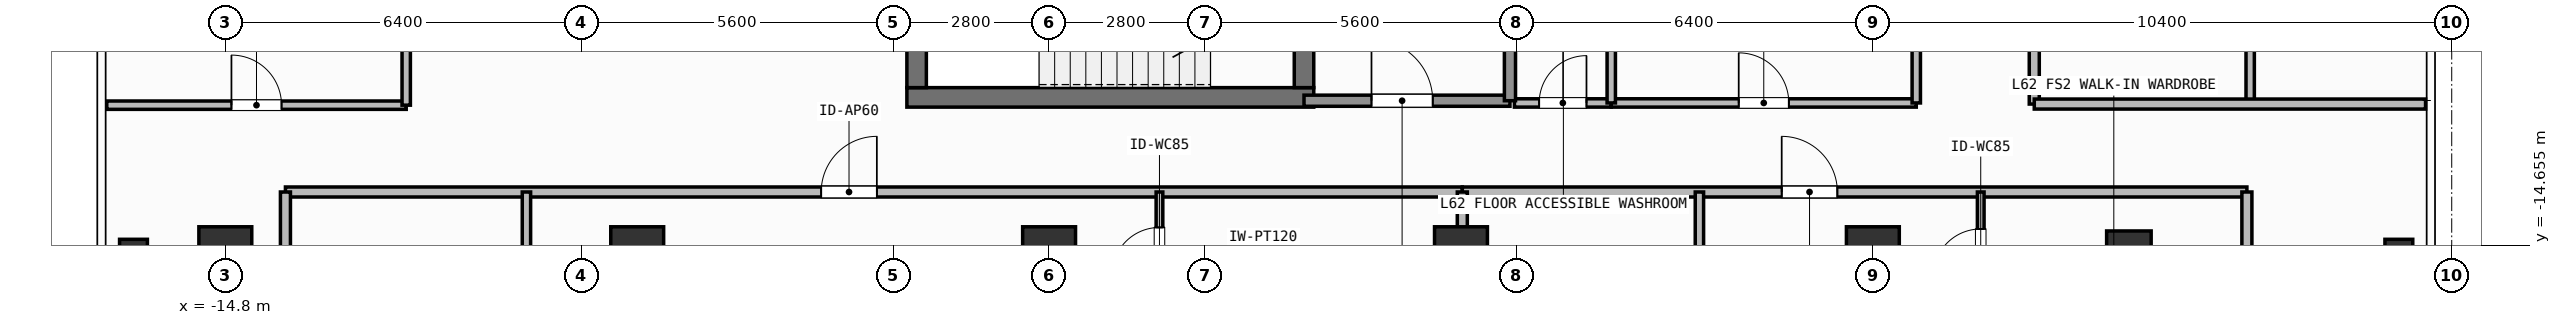
"""IFC4 building model, lengths in metres.
Left out: names, types, materials, properties, quantities, classifications, styles, units other than length and angle.
Written with IfcOpenShell. Run it as: python <this file> out.ifc"""

import sys

from ifc_helpers import new_model, si_unit, direction, frame, frame_2d, origin, origin_2d, place, context, subcontext, project, spatial, rectangle, hollow_rectangle, extrude, element, fill, save


model = new_model("IFC4")
c1 = context("Model", 3, precision=1e-05, world=origin(), true_north=direction((0.0, 1.0)))
c2 = subcontext(c1, "Body", "Model", "MODEL_VIEW")
j1 = project(units=[si_unit("LENGTHUNIT", "METRE"), si_unit("PLANEANGLEUNIT", "RADIAN")], contexts=[c1])
p1 = place(None, origin())
s1 = spatial("IfcSite", under=j1, at=p1, CompositionType="ELEMENT")
p2 = place(p1, origin())
s2 = spatial("IfcBuilding", under=s1, at=p2, CompositionType="ELEMENT")
p3 = place(p2, frame((0.0, 0.0, 254.7)))
s3 = spatial("IfcBuildingStorey", under=s2, at=p3, CompositionType="ELEMENT", Elevation=254.7)
p4 = place(p3, frame((-2.555, -12.0, 0.0), z_axis=(0.0, 0.0, 1.0), x_axis=(1.0, 0.0, 0.0)))
e1 = element("IfcWall", 1, at=p4, inside=s3, PredefinedType="SHEAR", context=c2, shape_type="SweptSolid", body=[
    extrude(rectangle(XDim=7.31, YDim=0.35, at=frame_2d((3.655, 0.0))), origin(), (0.0, 0.0, 1.0), 3.9),
])
p5 = place(p3, frame((-2.38, -11.825, 0.0), z_axis=(0.0, 0.0, 1.0), x_axis=(0.0, 1.0, 0.0)))
e2 = element("IfcWall", 2, at=p5, inside=s3, PredefinedType="SHEAR", context=c2, shape_type="SweptSolid", body=[
    extrude(rectangle(XDim=2.925, YDim=0.35, at=frame_2d((1.462, 0.0))), origin(), (0.0, 0.0, 1.0), 3.9),
])
p6 = place(p3, frame((4.58, -8.9, 0.0), z_axis=(0.0, 0.0, 1.0), x_axis=(0.0, -1.0, 0.0)))
e3 = element("IfcWall", 3, at=p6, inside=s3, PredefinedType="SHEAR", context=c2, shape_type="SweptSolid", body=[
    extrude(rectangle(XDim=2.925, YDim=0.35, at=frame_2d((1.462, 0.0))), origin(), (0.0, 0.0, 1.0), 3.9),
])
p7 = place(p6, frame((0.913, 0.0, 0.0)))
e4 = element("IfcOpeningElement", 4, at=p7, cuts=e3, PredefinedType="OPENING", context=c2, shape_type="SweptSolid", body=[
    extrude(rectangle(XDim=1.1, YDim=2.15, at=frame_2d((0.55, 1.075))), frame((0.0, 0.185, 0.0), z_axis=(0.0, -1.0, 0.0), x_axis=(1.0, 0.0, 0.0)), (0.0, 0.0, 1.0), 0.37),
])
for number, where, z_axis, x_axis in (
    (5, (-14.8, -14.8, 0.0), (0.0, 0.0, 1.0), (1.0, 0.0, 0.0)),
    (6, (-7.4, -14.8, 0.0), (0.0, 0.0, 1.0), (1.0, 0.0, 0.0)),
    (7, (0.0, -14.8, 0.0), (0.0, 0.0, 1.0), (1.0, 0.0, 0.0)),
    (8, (7.4, -14.8, 0.0), (0.0, 0.0, 1.0), (1.0, 0.0, 0.0)),
    (9, (14.8, -14.8, 0.0), (0.0, 0.0, 1.0), (1.0, 0.0, 0.0)),
):
    element("IfcColumn", number, at=place(p3, frame(where, z_axis=z_axis, x_axis=x_axis)), inside=s3, PredefinedType="COLUMN", context=c2, shape_type="SweptSolid", body=[
        extrude(rectangle(XDim=0.95, YDim=0.95, at=origin_2d()), origin(), (0.0, 0.0, 1.0), 3.9),
    ])
p8 = place(p3, frame((19.4, -14.8, 0.0), z_axis=(0.0, 0.0, 1.0), x_axis=(1.0, 0.0, 0.0)))
e10 = element("IfcColumn", 10, at=p8, inside=s3, PredefinedType="COLUMN", context=c2, shape_type="SweptSolid", body=[
    extrude(hollow_rectangle(XDim=0.8, YDim=0.8, WallThickness=0.036, at=origin_2d()), origin(), (0.0, 0.0, 1.0), 3.9),
])
for number, where, z_axis, x_axis in (
    (11, (-16.45, -14.8, 0.0), (0.0, 0.0, 1.0), (1.0, 0.0, 0.0)),
    (12, (24.25, -14.8, 0.0), (0.0, 0.0, 1.0), (1.0, 0.0, 0.0)),
):
    element("IfcColumn", number, at=place(p3, frame(where, z_axis=z_axis, x_axis=x_axis)), inside=s3, PredefinedType="COLUMN", context=c2, shape_type="SweptSolid", body=[
        extrude(hollow_rectangle(XDim=0.5, YDim=0.5, WallThickness=0.025, at=origin_2d()), origin(), (0.0, 0.0, 1.0), 3.9),
    ])
p9 = place(p3, frame((4.58, -12.06, 0.0), z_axis=(0.0, 0.0, 1.0), x_axis=(1.0, 0.0, 0.0)))
e13 = element("IfcWall", 13, at=p9, inside=s3, PredefinedType="SOLIDWALL", context=c2, shape_type="SweptSolid", body=[
    extrude(rectangle(XDim=3.7, YDim=0.2, at=frame_2d((1.85, 0.0))), origin(), (0.0, 0.0, 1.0), 3.68),
])
p10 = place(p9, frame((1.212, 0.0, 0.0)))
e14 = element("IfcOpeningElement", 14, at=p10, cuts=e13, PredefinedType="OPENING", context=c2, shape_type="SweptSolid", body=[
    extrude(rectangle(XDim=1.1, YDim=2.15, at=frame_2d((0.55, 1.075))), frame((0.0, 0.11, 0.0), z_axis=(0.0, -1.0, 0.0), x_axis=(1.0, 0.0, 0.0)), (0.0, 0.0, 1.0), 0.22),
])
p11 = place(p3, frame((8.36, -12.1, 0.0), z_axis=(0.0, 0.0, 1.0), x_axis=(1.0, 0.0, 0.0)))
e15 = element("IfcWall", 15, at=p11, inside=s3, PredefinedType="PARTITIONING", context=c2, shape_type="SweptSolid", body=[
    extrude(rectangle(XDim=1.74, YDim=0.15, at=frame_2d((0.87, 0.0))), origin(), (0.0, 0.0, 1.0), 3.68),
])
p12 = place(p11, frame((0.445, 0.0, 0.0)))
e16 = element("IfcOpeningElement", 16, at=p12, cuts=e15, PredefinedType="OPENING", context=c2, shape_type="SweptSolid", body=[
    extrude(rectangle(XDim=0.85, YDim=2.1, at=frame_2d((0.425, 1.05))), frame((0.0, 0.085, 0.0), z_axis=(0.0, -1.0, 0.0), x_axis=(1.0, 0.0, 0.0)), (0.0, 0.0, 1.0), 0.17),
])
p13 = place(p3, frame((10.1, -12.1, 0.0), z_axis=(0.0, 0.0, 1.0), x_axis=(1.0, 0.0, 0.0)))
e17 = element("IfcWall", 17, at=p13, inside=s3, PredefinedType="PARTITIONING", context=c2, shape_type="SweptSolid", body=[
    extrude(rectangle(XDim=5.48, YDim=0.15, at=frame_2d((2.74, 0.0))), origin(), (0.0, 0.0, 1.0), 3.68),
])
p14 = place(p13, frame((2.29, 0.0, 0.0)))
e18 = element("IfcOpeningElement", 18, at=p14, cuts=e17, PredefinedType="OPENING", context=c2, shape_type="SweptSolid", body=[
    extrude(rectangle(XDim=0.9, YDim=2.1, at=frame_2d((0.45, 1.05))), frame((0.0, 0.085, 0.0), z_axis=(0.0, -1.0, 0.0), x_axis=(1.0, 0.0, 0.0)), (0.0, 0.0, 1.0), 0.17),
])
p15 = place(p3, frame((-13.72, -13.7, 0.0), z_axis=(0.0, 0.0, 1.0), x_axis=(1.0, 0.0, 0.0)))
e19 = element("IfcWall", 19, at=p15, inside=s3, PredefinedType="PARTITIONING", context=c2, shape_type="SweptSolid", body=[
    extrude(rectangle(XDim=21.144, YDim=0.18, at=frame_2d((10.572, 0.0))), origin(), (0.0, 0.0, 1.0), 3.68),
])
p16 = place(p15, frame((9.625, 0.0, 0.0)))
e20 = element("IfcOpeningElement", 20, at=p16, cuts=e19, PredefinedType="OPENING", context=c2, shape_type="SweptSolid", body=[
    extrude(rectangle(XDim=1.0, YDim=2.2, at=frame_2d((0.5, 1.1))), frame((0.0, 0.1, 0.0), z_axis=(0.0, -1.0, 0.0), x_axis=(1.0, 0.0, 0.0)), (0.0, 0.0, 1.0), 0.2),
])
p17 = place(p3, frame((-9.39, -17.59, 0.0), z_axis=(0.0, 0.0, 1.0), x_axis=(0.0, 1.0, 0.0)))
e21 = element("IfcWall", 21, at=p17, inside=s3, PredefinedType="PARTITIONING", context=c2, shape_type="SweptSolid", body=[
    extrude(rectangle(XDim=3.89, YDim=0.15, at=frame_2d((1.945, 0.0))), origin(), (0.0, 0.0, 1.0), 3.68),
])
p18 = place(p17, frame((1.52, 0.0, 0.0)))
e22 = element("IfcOpeningElement", 22, at=p18, cuts=e21, PredefinedType="OPENING", context=c2, shape_type="SweptSolid", body=[
    extrude(rectangle(XDim=0.85, YDim=2.1, at=frame_2d((0.425, 1.05))), frame((0.0, 0.085, 0.0), z_axis=(0.0, -1.0, 0.0), x_axis=(1.0, 0.0, 0.0)), (0.0, 0.0, 1.0), 0.17),
])
p19 = place(p3, frame((1.983, -15.983, 0.0), z_axis=(0.0, 0.0, 1.0), x_axis=(0.0, 1.0, 0.0)))
e23 = element("IfcWall", 23, at=p19, inside=s3, PredefinedType="PARTITIONING", context=c2, shape_type="SweptSolid", body=[
    extrude(rectangle(XDim=2.283, YDim=0.12, at=frame_2d((1.142, 0.0))), origin(), (0.0, 0.0, 1.0), 3.68),
])
p20 = place(p19, frame((0.796, 0.0, 0.0)))
e24 = element("IfcOpeningElement", 24, at=p20, cuts=e23, PredefinedType="OPENING", context=c2, shape_type="SweptSolid", body=[
    extrude(rectangle(XDim=0.85, YDim=2.1, at=frame_2d((0.425, 1.05))), frame((0.0, 0.07, 0.0), z_axis=(0.0, -1.0, 0.0), x_axis=(1.0, 0.0, 0.0)), (0.0, 0.0, 1.0), 0.14),
])
p21 = place(p3, frame((7.424, -13.7, 0.0), z_axis=(0.0, 0.0, 1.0), x_axis=(1.0, 0.0, 0.0)))
e25 = element("IfcWall", 25, at=p21, inside=s3, PredefinedType="PARTITIONING", context=c2, shape_type="SweptSolid", body=[
    extrude(rectangle(XDim=14.096, YDim=0.18, at=frame_2d((7.048, 0.0))), origin(), (0.0, 0.0, 1.0), 3.68),
])
p22 = place(p21, frame((5.738, 0.0, 0.0)))
e26 = element("IfcOpeningElement", 26, at=p22, cuts=e25, PredefinedType="OPENING", context=c2, shape_type="SweptSolid", body=[
    extrude(rectangle(XDim=1.0, YDim=2.2, at=frame_2d((0.5, 1.1))), frame((0.0, 0.1, 0.0), z_axis=(0.0, -1.0, 0.0), x_axis=(1.0, 0.0, 0.0)), (0.0, 0.0, 1.0), 0.2),
])
p23 = place(p3, frame((11.684, -17.59, 0.0), z_axis=(0.0, 0.0, 1.0), x_axis=(0.0, 1.0, 0.0)))
e27 = element("IfcWall", 27, at=p23, inside=s3, PredefinedType="PARTITIONING", context=c2, shape_type="SweptSolid", body=[
    extrude(rectangle(XDim=3.89, YDim=0.15, at=frame_2d((1.945, 0.0))), origin(), (0.0, 0.0, 1.0), 3.68),
])
p24 = place(p23, frame((1.52, 0.0, 0.0)))
e28 = element("IfcOpeningElement", 28, at=p24, cuts=e27, PredefinedType="OPENING", context=c2, shape_type="SweptSolid", body=[
    extrude(rectangle(XDim=0.85, YDim=2.1, at=frame_2d((0.425, 1.05))), frame((0.0, 0.085, 0.0), z_axis=(0.0, -1.0, 0.0), x_axis=(1.0, 0.0, 0.0)), (0.0, 0.0, 1.0), 0.17),
])
p25 = place(p3, frame((16.738, -15.878, 0.0), z_axis=(0.0, 0.0, 1.0), x_axis=(0.0, 1.0, 0.0)))
e29 = element("IfcWall", 29, at=p25, inside=s3, PredefinedType="PARTITIONING", context=c2, shape_type="SweptSolid", body=[
    extrude(rectangle(XDim=2.178, YDim=0.12, at=frame_2d((1.089, 0.0))), origin(), (0.0, 0.0, 1.0), 3.68),
])
p26 = place(p25, frame((0.664, 0.0, 0.0)))
e30 = element("IfcOpeningElement", 30, at=p26, cuts=e29, PredefinedType="OPENING", context=c2, shape_type="SweptSolid", body=[
    extrude(rectangle(XDim=0.85, YDim=2.1, at=frame_2d((0.425, 1.05))), frame((0.0, 0.07, 0.0), z_axis=(0.0, -1.0, 0.0), x_axis=(1.0, 0.0, 0.0)), (0.0, 0.0, 1.0), 0.14),
])
p27 = place(p3, frame((-16.93, -12.14, 0.0), z_axis=(0.0, 0.0, 1.0), x_axis=(1.0, 0.0, 0.0)))
e31 = element("IfcWall", 31, at=p27, inside=s3, PredefinedType="PARTITIONING", context=c2, shape_type="SweptSolid", body=[
    extrude(rectangle(XDim=5.38, YDim=0.15, at=frame_2d((2.69, 0.0))), origin(), (0.0, 0.0, 1.0), 3.68),
])
p28 = place(p27, frame((2.24, 0.0, 0.0)))
e32 = element("IfcOpeningElement", 32, at=p28, cuts=e31, PredefinedType="OPENING", context=c2, shape_type="SweptSolid", body=[
    extrude(rectangle(XDim=0.9, YDim=2.1, at=frame_2d((0.45, 1.05))), frame((0.0, 0.085, 0.0), z_axis=(0.0, -1.0, 0.0), x_axis=(1.0, 0.0, 0.0)), (0.0, 0.0, 1.0), 0.17),
])
p29 = place(p3, frame((17.7, -12.12, 0.0), z_axis=(0.0, 0.0, 1.0), x_axis=(0.0, 1.0, 0.0)))
e33 = element("IfcWall", 33, at=p29, inside=s3, PredefinedType="PARTITIONING", context=c2, shape_type="SweptSolid", body=[
    extrude(rectangle(XDim=13.574, YDim=0.18, at=frame_2d((6.787, 0.0))), origin(), (0.0, 0.0, 1.0), 3.68),
])
p30 = place(p29, frame((5.665, 0.0, 0.0)))
e34 = element("IfcOpeningElement", 34, at=p30, cuts=e33, PredefinedType="OPENING", context=c2, shape_type="SweptSolid", body=[
    extrude(rectangle(XDim=1.0, YDim=2.2, at=frame_2d((0.5, 1.1))), frame((0.0, 0.1, 0.0), z_axis=(0.0, -1.0, 0.0), x_axis=(1.0, 0.0, 0.0)), (0.0, 0.0, 1.0), 0.2),
])
p31 = place(p3, frame((8.28, -12.06, 0.0), z_axis=(0.0, 0.0, 1.0), x_axis=(0.0, 1.0, 0.0)))
e35 = element("IfcWall", 35, at=p31, inside=s3, PredefinedType="SOLIDWALL", context=c2, shape_type="SweptSolid", body=[
    extrude(rectangle(XDim=3.335, YDim=0.2, at=frame_2d((1.667, 0.0))), origin(), (0.0, 0.0, 1.0), 3.68),
])
p32 = place(p3, frame((10.1, -12.1, 0.0), z_axis=(0.0, 0.0, 1.0), x_axis=(0.0, 1.0, 0.0)))
e36 = element("IfcWall", 36, at=p32, inside=s3, PredefinedType="PARTITIONING", context=c2, shape_type="SweptSolid", body=[
    extrude(rectangle(XDim=2.35, YDim=0.15, at=frame_2d((1.175, 0.0))), origin(), (0.0, 0.0, 1.0), 3.68),
])
p33 = place(p3, frame((15.58, -12.1, 0.0), z_axis=(0.0, 0.0, 1.0), x_axis=(0.0, 1.0, 0.0)))
e37 = element("IfcWall", 37, at=p33, inside=s3, PredefinedType="PARTITIONING", context=c2, shape_type="SweptSolid", body=[
    extrude(rectangle(XDim=6.25, YDim=0.15, at=frame_2d((3.125, 0.0))), origin(), (0.0, 0.0, 1.0), 3.68),
])
for number, where, z_axis, x_axis in (
    (38, (-13.72, -19.51, 0.0), (0.0, 0.0, 1.0), (0.0, 1.0, 0.0)),
    (39, (21.52, -19.51, 0.0), (0.0, 0.0, 1.0), (0.0, 1.0, 0.0)),
):
    element("IfcWall", number, at=place(p3, frame(where, z_axis=z_axis, x_axis=x_axis)), inside=s3, PredefinedType="PARTITIONING", context=c2, shape_type="SweptSolid", body=[
        extrude(rectangle(XDim=5.81, YDim=0.18, at=frame_2d((2.905, 0.0))), origin(), (0.0, 0.0, 1.0), 3.68),
    ])
p34 = place(p3, frame((7.424, -20.63, 0.0), z_axis=(0.0, 0.0, 1.0), x_axis=(0.0, 1.0, 0.0)))
e40 = element("IfcWall", 40, at=p34, inside=s3, PredefinedType="PARTITIONING", context=c2, shape_type="SweptSolid", body=[
    extrude(rectangle(XDim=6.93, YDim=0.18, at=frame_2d((3.465, 0.0))), origin(), (0.0, 0.0, 1.0), 3.182),
])
p35 = place(p3, frame((-11.55, -12.14, 0.0), z_axis=(0.0, 0.0, 1.0), x_axis=(0.0, 1.0, 0.0)))
e41 = element("IfcWall", 41, at=p35, inside=s3, PredefinedType="PARTITIONING", context=c2, shape_type="SweptSolid", body=[
    extrude(rectangle(XDim=13.94, YDim=0.15, at=frame_2d((6.97, 0.0))), origin(), (0.0, 0.0, 1.0), 3.68),
])
p36 = place(p3, frame((21.579, -12.12, 0.0), z_axis=(0.0, 0.0, 1.0), x_axis=(0.0, 1.0, 0.0)))
e42 = element("IfcWall", 42, at=p36, inside=s3, PredefinedType="PARTITIONING", context=c2, shape_type="SweptSolid", body=[
    extrude(rectangle(XDim=3.493, YDim=0.15, at=frame_2d((1.747, 0.0))), origin(), (0.0, 0.0, 1.0), 3.68),
])
p37 = place(p3, frame((17.7, -12.12, 0.0), z_axis=(0.0, 0.0, 1.0), x_axis=(1.0, 0.0, 0.0)))
e43 = element("IfcWall", 43, at=p37, inside=s3, PredefinedType="PARTITIONING", context=c2, shape_type="SweptSolid", body=[
    extrude(rectangle(XDim=7.03, YDim=0.18, at=frame_2d((3.515, 0.0))), origin(), (0.0, 0.0, 1.0), 3.68),
])
p38 = place(p10, origin())
e44 = element("IfcDoor", 44, at=p38, inside=s3, OperationType="SINGLE_SWING_LEFT", PredefinedType="DOOR", context=c2, shape_type="SweptSolid", body=[
    extrude(rectangle(XDim=1.1, YDim=2.15, at=frame_2d((0.55, 1.075))), frame((0.0, 0.025, 0.0), z_axis=(0.0, -1.0, 0.0), x_axis=(1.0, 0.0, 0.0)), (0.0, 0.0, 1.0), 0.05),
])
fill(e14, e44)
p39 = place(p12, origin())
e45 = element("IfcDoor", 45, at=p39, inside=s3, OperationType="SINGLE_SWING_RIGHT", PredefinedType="DOOR", context=c2, shape_type="SweptSolid", body=[
    extrude(rectangle(XDim=0.85, YDim=2.1, at=frame_2d((0.425, 1.05))), frame((0.0, 0.025, 0.0), z_axis=(0.0, -1.0, 0.0), x_axis=(1.0, 0.0, 0.0)), (0.0, 0.0, 1.0), 0.05),
])
fill(e16, e45)
p40 = place(p14, origin())
e46 = element("IfcDoor", 46, at=p40, inside=s3, OperationType="SINGLE_SWING_LEFT", PredefinedType="DOOR", context=c2, shape_type="SweptSolid", body=[
    extrude(rectangle(XDim=0.9, YDim=2.1, at=frame_2d((0.45, 1.05))), frame((0.0, 0.025, 0.0), z_axis=(0.0, -1.0, 0.0), x_axis=(1.0, 0.0, 0.0)), (0.0, 0.0, 1.0), 0.05),
])
fill(e18, e46)
p41 = place(p16, origin())
e47 = element("IfcDoor", 47, at=p41, inside=s3, OperationType="SINGLE_SWING_RIGHT", PredefinedType="DOOR", context=c2, shape_type="SweptSolid", body=[
    extrude(rectangle(XDim=1.0, YDim=2.2, at=frame_2d((0.5, 1.1))), frame((0.0, 0.025, 0.0), z_axis=(0.0, -1.0, 0.0), x_axis=(1.0, 0.0, 0.0)), (0.0, 0.0, 1.0), 0.05),
])
fill(e20, e47)
p42 = place(p20, origin())
e48 = element("IfcDoor", 48, at=p42, inside=s3, OperationType="SINGLE_SWING_LEFT", PredefinedType="DOOR", context=c2, shape_type="SweptSolid", body=[
    extrude(rectangle(XDim=0.85, YDim=2.1, at=frame_2d((0.425, 1.05))), frame((0.0, 0.025, 0.0), z_axis=(0.0, -1.0, 0.0), x_axis=(1.0, 0.0, 0.0)), (0.0, 0.0, 1.0), 0.05),
])
fill(e24, e48)
p43 = place(p22, origin())
e49 = element("IfcDoor", 49, at=p43, inside=s3, OperationType="SINGLE_SWING_LEFT", PredefinedType="DOOR", context=c2, shape_type="SweptSolid", body=[
    extrude(rectangle(XDim=1.0, YDim=2.2, at=frame_2d((0.5, 1.1))), frame((0.0, 0.025, 0.0), z_axis=(0.0, -1.0, 0.0), x_axis=(1.0, 0.0, 0.0)), (0.0, 0.0, 1.0), 0.05),
])
fill(e26, e49)
p44 = place(p26, origin())
e50 = element("IfcDoor", 50, at=p44, inside=s3, OperationType="SINGLE_SWING_LEFT", PredefinedType="DOOR", context=c2, shape_type="SweptSolid", body=[
    extrude(rectangle(XDim=0.85, YDim=2.1, at=frame_2d((0.425, 1.05))), frame((0.0, 0.025, 0.0), z_axis=(0.0, -1.0, 0.0), x_axis=(1.0, 0.0, 0.0)), (0.0, 0.0, 1.0), 0.05),
])
fill(e30, e50)
p45 = place(p28, origin())
e51 = element("IfcDoor", 51, at=p45, inside=s3, OperationType="SINGLE_SWING_LEFT", PredefinedType="DOOR", context=c2, shape_type="SweptSolid", body=[
    extrude(rectangle(XDim=0.9, YDim=2.1, at=frame_2d((0.45, 1.05))), frame((0.0, 0.025, 0.0), z_axis=(0.0, -1.0, 0.0), x_axis=(1.0, 0.0, 0.0)), (0.0, 0.0, 1.0), 0.05),
])
fill(e32, e51)
save(model, sys.argv[1])
